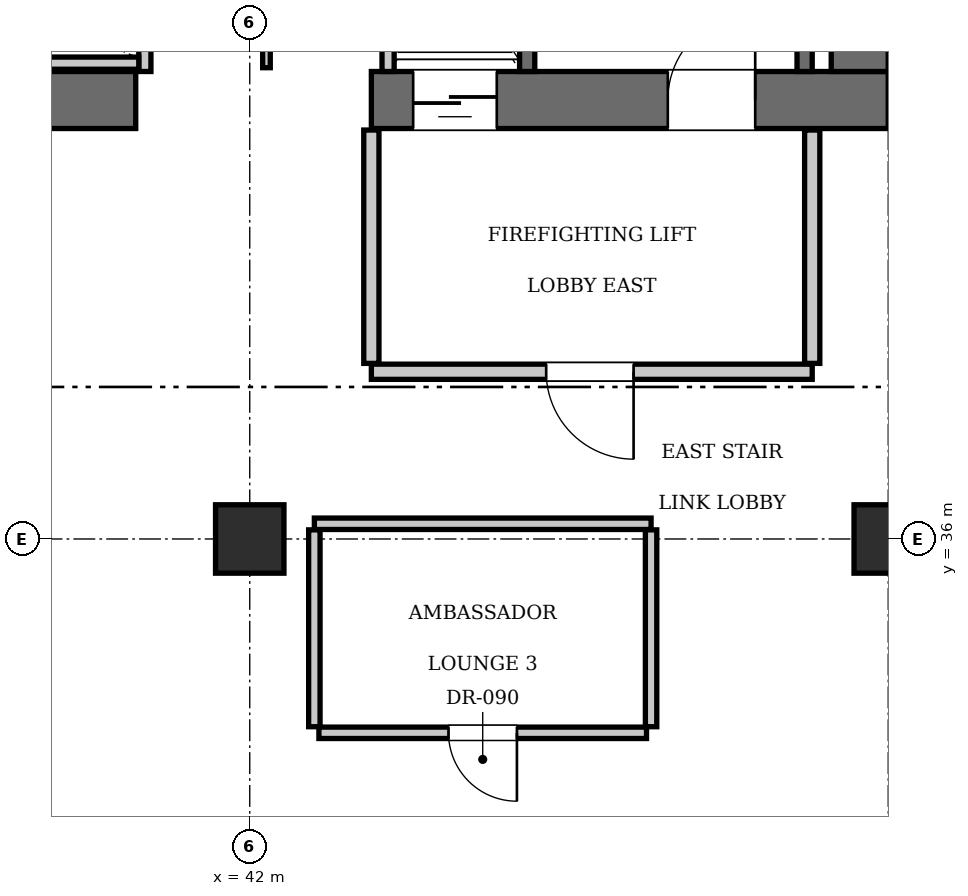
"""IFC4 building model, lengths in metres.
Left out: names, types, materials, properties, quantities, classifications, styles, units other than length and angle.
Written with IfcOpenShell. Run it as: python <this file> out.ifc"""

import sys

from ifc_helpers import new_model, si_unit, direction, frame, frame_2d, origin, origin_2d, place, context, subcontext, project, spatial, rectangle, extrude, element, fill, save


model = new_model("IFC4")
c1 = context("Model", 3, precision=1e-05, world=origin(), true_north=direction((0.0, 1.0)))
c2 = subcontext(c1, "Body", "Model", "MODEL_VIEW")
j1 = project(units=[si_unit("LENGTHUNIT", "METRE"), si_unit("PLANEANGLEUNIT", "RADIAN")], contexts=[c1])
p1 = place(None, origin())
s1 = spatial("IfcSite", under=j1, at=p1, CompositionType="ELEMENT")
p2 = place(p1, origin())
s2 = spatial("IfcBuilding", under=s1, at=p2, CompositionType="ELEMENT")
p3 = place(p2, frame((0.0, 0.0, 223.65)))
s3 = spatial("IfcBuildingStorey", under=s2, at=p3, CompositionType="ELEMENT", Elevation=223.65)
p4 = place(p3, frame((35.1, 41.775, 0.0), z_axis=(0.0, 0.0, 1.0), x_axis=(1.0, 0.0, 0.0)))
e1 = element("IfcWall", 1, at=p4, inside=s3, PredefinedType="SHEAR", context=c2, shape_type="SweptSolid", body=[
    extrude(rectangle(XDim=5.4, YDim=0.75, at=frame_2d((2.7, 0.0))), origin(), (0.0, 0.0, 1.0), 3.85),
])
p5 = place(p3, frame((43.6, 41.775, 0.0), z_axis=(0.0, 0.0, 1.0), x_axis=(1.0, 0.0, 0.0)))
e2 = element("IfcWall", 2, at=p5, inside=s3, PredefinedType="SHEAR", context=c2, shape_type="SweptSolid", body=[
    extrude(rectangle(XDim=6.8, YDim=0.75, at=frame_2d((3.4, 0.0))), origin(), (0.0, 0.0, 1.0), 3.85),
])
p6 = place(p5, frame((3.9, 0.0, 0.0)))
e3 = element("IfcOpeningElement", 3, at=p6, cuts=e2, PredefinedType="OPENING", context=c2, shape_type="SweptSolid", body=[
    extrude(rectangle(XDim=1.15, YDim=2.15, at=frame_2d((0.575, 1.075))), frame((0.0, 0.385, 0.0), z_axis=(0.0, -1.0, 0.0), x_axis=(1.0, 0.0, 0.0)), (0.0, 0.0, 1.0), 0.77),
])
p7 = place(p5, frame((0.55, 0.0, 0.0)))
e4 = element("IfcOpeningElement", 4, at=p7, cuts=e2, PredefinedType="OPENING", context=c2, shape_type="SweptSolid", body=[
    extrude(rectangle(XDim=1.1, YDim=2.2, at=frame_2d((0.55, 1.1))), frame((0.0, 0.385, 0.0), z_axis=(0.0, -1.0, 0.0), x_axis=(1.0, 0.0, 0.0)), (0.0, 0.0, 1.0), 0.77),
])
p8 = place(p3, frame((50.025, 42.15, 0.0), z_axis=(0.0, 0.0, 1.0), x_axis=(0.0, 1.0, 0.0)))
e5 = element("IfcWall", 5, at=p8, inside=s3, PredefinedType="SHEAR", context=c2, shape_type="SweptSolid", body=[
    extrude(rectangle(XDim=1.9, YDim=0.75, at=frame_2d((0.95, 0.0))), origin(), (0.0, 0.0, 1.0), 3.85),
])
for number, where, z_axis, x_axis in (
    (6, (42.0, 36.0, 0.0), (0.0, 0.0, 1.0), (1.0, 0.0, 0.0)),
    (7, (50.4, 36.0, 0.0), (0.0, 0.0, 1.0), (1.0, 0.0, 0.0)),
):
    element("IfcColumn", number, at=place(p3, frame(where, z_axis=z_axis, x_axis=x_axis)), inside=s3, PredefinedType="COLUMN", context=c2, shape_type="SweptSolid", body=[
        extrude(rectangle(XDim=0.9, YDim=0.9, at=origin_2d()), origin(), (0.0, 0.0, 1.0), 3.85),
    ])
p9 = place(p3, frame((45.65, 42.15, 0.0), z_axis=(0.0, 0.0, 1.0), x_axis=(0.0, 1.0, 0.0)))
e8 = element("IfcWall", 8, at=p9, inside=s3, PredefinedType="SOLIDWALL", context=c2, shape_type="SweptSolid", body=[
    extrude(rectangle(XDim=9.0, YDim=0.2, at=frame_2d((4.5, 0.0))), origin(), (0.0, 0.0, 1.0), 3.55),
])
p10 = place(p3, frame((49.3, 42.15, 0.0), z_axis=(0.0, 0.0, 1.0), x_axis=(0.0, 1.0, 0.0)))
e9 = element("IfcWall", 9, at=p10, inside=s3, PredefinedType="SOLIDWALL", context=c2, shape_type="SweptSolid", body=[
    extrude(rectangle(XDim=1.87, YDim=0.2, at=frame_2d((0.935, 0.0))), origin(), (0.0, 0.0, 1.0), 3.55),
])
p11 = place(p3, frame((43.82, 42.15, 0.0), z_axis=(0.0, 0.0, 1.0), x_axis=(0.0, 1.0, 0.0)))
e10 = element("IfcWall", 10, at=p11, inside=s3, PredefinedType="SOLIDWALL", context=c2, shape_type="SweptSolid", body=[
    extrude(rectangle(XDim=2.59, YDim=0.16, at=frame_2d((1.295, 0.0))), origin(), (0.0, 0.0, 1.0), 3.55),
])
p12 = place(p3, frame((40.62, 42.15, 0.0), z_axis=(0.0, 0.0, 1.0), x_axis=(0.0, 1.0, 0.0)))
e11 = element("IfcWall", 11, at=p12, inside=s3, PredefinedType="SOLIDWALL", context=c2, shape_type="SweptSolid", body=[
    extrude(rectangle(XDim=2.2, YDim=0.16, at=frame_2d((1.1, 0.0))), origin(), (0.0, 0.0, 1.0), 3.55),
])
p13 = place(p3, frame((35.52, 42.26, 0.0), z_axis=(0.0, 0.0, 1.0), x_axis=(1.0, 0.0, 0.0)))
e12 = element("IfcWall", 12, at=p13, inside=s3, PredefinedType="SOLIDWALL", context=c2, shape_type="SweptSolid", body=[
    extrude(rectangle(XDim=5.02, YDim=0.16, at=frame_2d((2.51, 0.0))), origin(), (0.0, 0.0, 1.0), 3.55),
])
p14 = place(p3, frame((43.6, 38.2, 0.0), z_axis=(0.0, 0.0, 1.0), x_axis=(1.0, 0.0, 0.0)))
e13 = element("IfcWall", 13, at=p14, inside=s3, PredefinedType="PARTITIONING", context=c2, shape_type="SweptSolid", body=[
    extrude(rectangle(XDim=5.8, YDim=0.2, at=frame_2d((2.9, 0.0))), origin(), (0.0, 0.0, 1.0), 3.55),
])
p15 = place(p14, frame((2.3, 0.0, 0.0)))
e14 = element("IfcOpeningElement", 14, at=p15, cuts=e13, PredefinedType="OPENING", context=c2, shape_type="SweptSolid", body=[
    extrude(rectangle(XDim=1.15, YDim=2.15, at=frame_2d((0.575, 1.075))), frame((0.0, 0.11, 0.0), z_axis=(0.0, -1.0, 0.0), x_axis=(1.0, 0.0, 0.0)), (0.0, 0.0, 1.0), 0.22),
])
for number, where, z_axis, x_axis in (
    (15, (43.6, 38.31, 0.0), (0.0, 0.0, 1.0), (0.0, 1.0, 0.0)),
    (16, (49.4, 38.31, 0.0), (0.0, 0.0, 1.0), (0.0, 1.0, 0.0)),
):
    element("IfcWall", number, at=place(p3, frame(where, z_axis=z_axis, x_axis=x_axis)), inside=s3, PredefinedType="PARTITIONING", context=c2, shape_type="SweptSolid", body=[
        extrude(rectangle(XDim=3.07, YDim=0.2, at=frame_2d((1.535, 0.0))), origin(), (0.0, 0.0, 1.0), 3.55),
    ])
p16 = place(p3, frame((42.22, 42.2, 0.0), z_axis=(0.0, 0.0, 1.0), x_axis=(0.0, 1.0, 0.0)))
e17 = element("IfcWall", 17, at=p16, inside=s3, PredefinedType="PARTITIONING", context=c2, shape_type="SweptSolid", body=[
    extrude(rectangle(XDim=2.76, YDim=0.1, at=frame_2d((1.38, 0.0))), origin(), (0.0, 0.0, 1.0), 3.55),
])
p17 = place(p16, frame((0.65, 0.0, 0.0)))
e18 = element("IfcOpeningElement", 18, at=p17, cuts=e17, PredefinedType="OPENING", context=c2, shape_type="SweptSolid", body=[
    extrude(rectangle(XDim=0.8, YDim=2.05, at=frame_2d((0.4, 1.025))), frame((0.0, 0.06, 0.0), z_axis=(0.0, -1.0, 0.0), x_axis=(1.0, 0.0, 0.0)), (0.0, 0.0, 1.0), 0.12),
])
p18 = place(p3, frame((42.85, 36.2, 0.0), z_axis=(0.0, 0.0, 1.0), x_axis=(1.0, 0.0, 0.0)))
e19 = element("IfcWall", 19, at=p18, inside=s3, PredefinedType="PARTITIONING", context=c2, shape_type="SweptSolid", body=[
    extrude(rectangle(XDim=4.43, YDim=0.15, at=frame_2d((2.215, 0.0))), origin(), (0.0, 0.0, 1.0), 3.55),
])
for number, where, z_axis, x_axis in (
    (20, (42.85, 33.53, 0.0), (0.0, 0.0, 1.0), (0.0, 1.0, 0.0)),
    (21, (47.28, 33.53, 0.0), (0.0, 0.0, 1.0), (0.0, 1.0, 0.0)),
):
    element("IfcWall", number, at=place(p3, frame(where, z_axis=z_axis, x_axis=x_axis)), inside=s3, PredefinedType="PARTITIONING", context=c2, shape_type="SweptSolid", body=[
        extrude(rectangle(XDim=2.59, YDim=0.15, at=frame_2d((1.295, 0.0))), origin(), (0.0, 0.0, 1.0), 3.55),
    ])
p19 = place(p3, frame((42.91, 33.45, 0.0), z_axis=(0.0, 0.0, 1.0), x_axis=(1.0, 0.0, 0.0)))
e22 = element("IfcWall", 22, at=p19, inside=s3, PredefinedType="PARTITIONING", context=c2, shape_type="SweptSolid", body=[
    extrude(rectangle(XDim=4.31, YDim=0.15, at=frame_2d((2.155, 0.0))), origin(), (0.0, 0.0, 1.0), 3.55),
])
p20 = place(p19, frame((1.705, 0.0, 0.0)))
e23 = element("IfcOpeningElement", 23, at=p20, cuts=e22, PredefinedType="OPENING", context=c2, shape_type="SweptSolid", body=[
    extrude(rectangle(XDim=0.9, YDim=2.1, at=frame_2d((0.45, 1.05))), frame((0.0, 0.085, 0.0), z_axis=(0.0, -1.0, 0.0), x_axis=(1.0, 0.0, 0.0)), (0.0, 0.0, 1.0), 0.17),
])
p21 = place(p6, origin())
e24 = element("IfcDoor", 24, at=p21, inside=s3, OperationType="SINGLE_SWING_RIGHT", PredefinedType="DOOR", context=c2, shape_type="SweptSolid", body=[
    extrude(rectangle(XDim=1.15, YDim=2.15, at=frame_2d((0.575, 1.075))), frame((0.0, 0.025, 0.0), z_axis=(0.0, -1.0, 0.0), x_axis=(1.0, 0.0, 0.0)), (0.0, 0.0, 1.0), 0.05),
])
fill(e3, e24)
p22 = place(p7, frame((1.1, 0.0, 0.0), z_axis=(0.0, 0.0, 1.0), x_axis=(-1.0, 0.0, 0.0)))
e25 = element("IfcDoor", 25, at=p22, inside=s3, OperationType="SLIDING_TO_LEFT", PredefinedType="DOOR", context=c2, shape_type="SweptSolid", body=[
    extrude(rectangle(XDim=1.1, YDim=2.2, at=frame_2d((0.55, 1.1))), frame((0.0, 0.025, 0.0), z_axis=(0.0, -1.0, 0.0), x_axis=(1.0, 0.0, 0.0)), (0.0, 0.0, 1.0), 0.05),
])
fill(e4, e25)
p23 = place(p15, frame((1.15, 0.0, 0.0), z_axis=(0.0, 0.0, 1.0), x_axis=(-1.0, 0.0, 0.0)))
e26 = element("IfcDoor", 26, at=p23, inside=s3, OperationType="SINGLE_SWING_LEFT", PredefinedType="DOOR", context=c2, shape_type="SweptSolid", body=[
    extrude(rectangle(XDim=1.15, YDim=2.15, at=frame_2d((0.575, 1.075))), frame((0.0, 0.025, 0.0), z_axis=(0.0, -1.0, 0.0), x_axis=(1.0, 0.0, 0.0)), (0.0, 0.0, 1.0), 0.05),
])
fill(e14, e26)
p24 = place(p20, frame((0.9, 0.0, 0.0), z_axis=(0.0, 0.0, 1.0), x_axis=(-1.0, 0.0, 0.0)))
e27 = element("IfcDoor", 27, at=p24, inside=s3, OperationType="SINGLE_SWING_LEFT", PredefinedType="DOOR", context=c2, shape_type="SweptSolid", body=[
    extrude(rectangle(XDim=0.9, YDim=2.1, at=frame_2d((0.45, 1.05))), frame((0.0, 0.025, 0.0), z_axis=(0.0, -1.0, 0.0), x_axis=(1.0, 0.0, 0.0)), (0.0, 0.0, 1.0), 0.05),
])
fill(e23, e27)
save(model, sys.argv[1])
